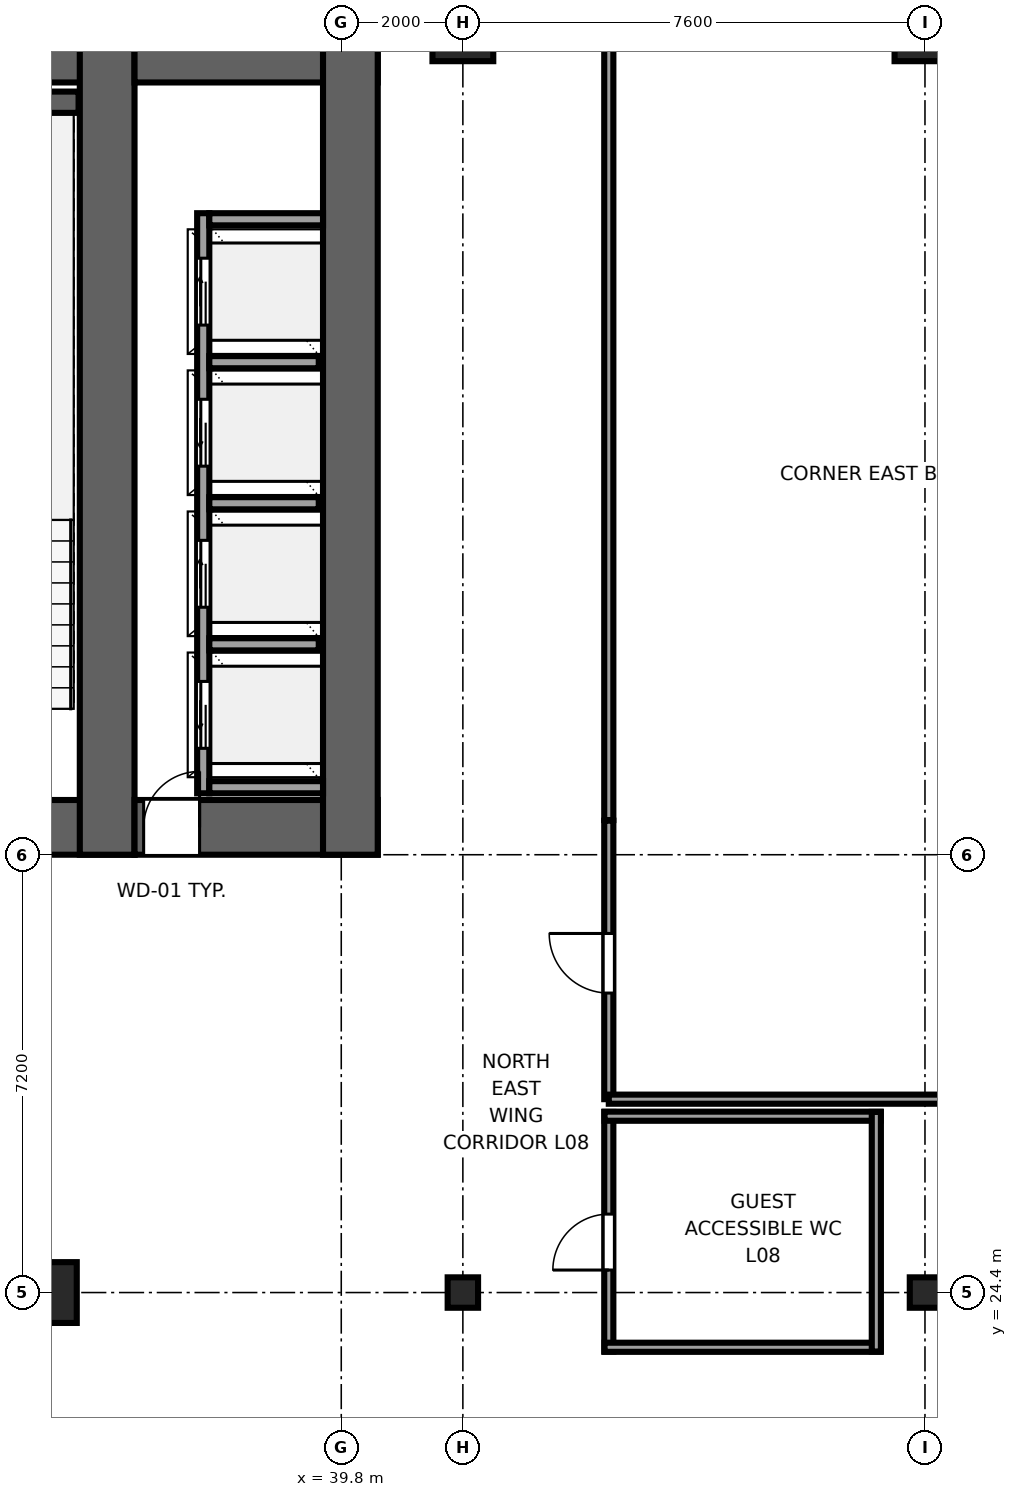
"""IFC4 building model, lengths in metres.
Left out: names, types, materials, properties, quantities, classifications, styles, units other than length and angle.
Written with IfcOpenShell. Run it as: python <this file> out.ifc"""

import sys

from ifc_helpers import new_model, si_unit, direction, frame, frame_2d, origin, origin_2d, place, context, subcontext, project, spatial, rectangle, i_section, extrude, source, transform, mapped, element, fill, save


model = new_model("IFC4")
c1 = context("Model", 3, precision=1e-05, world=origin(), true_north=direction((0.0, 1.0)))
c2 = subcontext(c1, "Body", "Model", "MODEL_VIEW")
j1 = project(units=[si_unit("LENGTHUNIT", "METRE"), si_unit("PLANEANGLEUNIT", "RADIAN")], contexts=[c1])
p1 = place(None, origin())
s1 = spatial("IfcSite", under=j1, at=p1, CompositionType="ELEMENT")
p2 = place(p1, origin())
s2 = spatial("IfcBuilding", under=s1, at=p2, CompositionType="ELEMENT")
p3 = place(p2, frame((0.0, 0.0, 39.1)))
s3 = spatial("IfcBuildingStorey", under=s2, at=p3, CompositionType="ELEMENT", Elevation=39.1)
p4 = place(p3, frame((9.6, 32.05, 0.0), z_axis=(0.0, 0.0, 1.0), x_axis=(1.0, 0.0, 0.0)))
e1 = element("IfcWall", 1, at=p4, inside=s3, PredefinedType="SHEAR", context=c2, shape_type="SweptSolid", body=[
    extrude(rectangle(XDim=26.8, YDim=0.9, at=frame_2d((13.4, 0.0))), origin(), (0.0, 0.0, 1.0), 3.55),
])
p5 = place(p4, frame((6.52, 0.0, 0.0), z_axis=(0.0, 0.0, 1.0), x_axis=(-1.0, 0.0, 0.0)))
e2 = element("IfcOpeningElement", 2, at=p5, cuts=e1, PredefinedType="OPENING", context=c2, shape_type="SweptSolid", body=[
    extrude(rectangle(XDim=1.5, YDim=2.04, at=frame_2d((0.75, 1.02))), frame((0.0, 0.46, 0.0), z_axis=(0.0, -1.0, 0.0), x_axis=(1.0, 0.0, 0.0)), (0.0, 0.0, 1.0), 0.92),
])
p6 = place(p4, frame((14.15, 0.0, 0.0), z_axis=(0.0, 0.0, 1.0), x_axis=(-1.0, 0.0, 0.0)))
e3 = element("IfcOpeningElement", 3, at=p6, cuts=e1, PredefinedType="OPENING", context=c2, shape_type="SweptSolid", body=[
    extrude(rectangle(XDim=1.5, YDim=2.04, at=frame_2d((0.75, 1.02))), frame((0.0, 0.46, 0.0), z_axis=(0.0, -1.0, 0.0), x_axis=(1.0, 0.0, 0.0)), (0.0, 0.0, 1.0), 0.92),
])
p7 = place(p4, frame((21.78, 0.0, 0.0), z_axis=(0.0, 0.0, 1.0), x_axis=(-1.0, 0.0, 0.0)))
e4 = element("IfcOpeningElement", 4, at=p7, cuts=e1, PredefinedType="OPENING", context=c2, shape_type="SweptSolid", body=[
    extrude(rectangle(XDim=1.5, YDim=2.04, at=frame_2d((0.75, 1.02))), frame((0.0, 0.46, 0.0), z_axis=(0.0, -1.0, 0.0), x_axis=(1.0, 0.0, 0.0)), (0.0, 0.0, 1.0), 0.92),
])
p8 = place(p4, frame((8.57, 0.0, 0.0), z_axis=(0.0, 0.0, 1.0), x_axis=(-1.0, 0.0, 0.0)))
e5 = element("IfcOpeningElement", 5, at=p8, cuts=e1, PredefinedType="OPENING", context=c2, shape_type="SweptSolid", body=[
    extrude(rectangle(XDim=0.82, YDim=2.01, at=frame_2d((0.41, 1.005))), frame((0.0, 0.46, 0.0), z_axis=(0.0, -1.0, 0.0), x_axis=(1.0, 0.0, 0.0)), (0.0, 0.0, 1.0), 0.92),
])
p9 = place(p4, frame((19.07, 0.0, 0.0), z_axis=(0.0, 0.0, 1.0), x_axis=(-1.0, 0.0, 0.0)))
e6 = element("IfcOpeningElement", 6, at=p9, cuts=e1, PredefinedType="OPENING", context=c2, shape_type="SweptSolid", body=[
    extrude(rectangle(XDim=0.82, YDim=2.01, at=frame_2d((0.41, 1.005))), frame((0.0, 0.46, 0.0), z_axis=(0.0, -1.0, 0.0), x_axis=(1.0, 0.0, 0.0)), (0.0, 0.0, 1.0), 0.92),
])
p10 = place(p3, frame((9.6, 44.75, 0.0), z_axis=(0.0, 0.0, 1.0), x_axis=(1.0, 0.0, 0.0)))
e7 = element("IfcWall", 7, at=p10, inside=s3, PredefinedType="SHEAR", context=c2, shape_type="SweptSolid", body=[
    extrude(rectangle(XDim=26.8, YDim=0.9, at=frame_2d((13.4, 0.0))), origin(), (0.0, 0.0, 1.0), 3.55),
])
p11 = place(p3, frame((35.95, 31.6, 0.0), z_axis=(0.0, 0.0, 1.0), x_axis=(0.0, 1.0, 0.0)))
e8 = element("IfcWall", 8, at=p11, inside=s3, PredefinedType="SHEAR", context=c2, shape_type="SweptSolid", body=[
    extrude(rectangle(XDim=13.6, YDim=0.9, at=frame_2d((6.8, 0.0))), origin(), (0.0, 0.0, 1.0), 3.55),
])
p12 = place(p3, frame((36.4, 32.05, 0.0), z_axis=(0.0, 0.0, 1.0), x_axis=(1.0, 0.0, 0.0)))
e9 = element("IfcWall", 9, at=p12, inside=s3, PredefinedType="SHEAR", context=c2, shape_type="SweptSolid", body=[
    extrude(rectangle(XDim=4.0, YDim=0.9, at=frame_2d((2.0, 0.0))), origin(), (0.0, 0.0, 1.0), 3.55),
])
p13 = place(p12, frame((1.07, 0.0, 0.0), z_axis=(0.0, 0.0, 1.0), x_axis=(-1.0, 0.0, 0.0)))
e10 = element("IfcOpeningElement", 10, at=p13, cuts=e9, PredefinedType="OPENING", context=c2, shape_type="SweptSolid", body=[
    extrude(rectangle(XDim=0.92, YDim=2.01, at=frame_2d((0.46, 1.005))), frame((0.0, 0.46, 0.0), z_axis=(0.0, -1.0, 0.0), x_axis=(1.0, 0.0, 0.0)), (0.0, 0.0, 1.0), 0.92),
])
p14 = place(p3, frame((36.4, 44.75, 0.0), z_axis=(0.0, 0.0, 1.0), x_axis=(1.0, 0.0, 0.0)))
e11 = element("IfcWall", 11, at=p14, inside=s3, PredefinedType="SHEAR", context=c2, shape_type="SweptSolid", body=[
    extrude(rectangle(XDim=4.0, YDim=0.9, at=frame_2d((2.0, 0.0))), origin(), (0.0, 0.0, 1.0), 3.55),
])
p15 = place(p3, frame((39.95, 31.6, 0.0), z_axis=(0.0, 0.0, 1.0), x_axis=(0.0, 1.0, 0.0)))
e12 = element("IfcWall", 12, at=p15, inside=s3, PredefinedType="SHEAR", context=c2, shape_type="SweptSolid", body=[
    extrude(rectangle(XDim=13.6, YDim=0.9, at=frame_2d((6.8, 0.0))), origin(), (0.0, 0.0, 1.0), 3.55),
])
p16 = place(p3, frame((31.88, 43.975, 0.0), z_axis=(0.0, 0.0, 1.0), x_axis=(1.0, 0.0, 0.0)))
e13 = element("IfcWall", 13, at=p16, inside=s3, PredefinedType="SHEAR", context=c2, shape_type="SweptSolid", body=[
    extrude(rectangle(XDim=3.6, YDim=0.35, at=frame_2d((1.8, 0.0))), origin(), (0.0, 0.0, 1.0), 3.55),
])
m1 = source(origin(), c2, "Body", "SweptSolid", [
    extrude(rectangle(XDim=1.0, YDim=1.0, at=origin_2d()), origin(), (0.0, 0.0, 1.0), 3.55),
])
p17 = place(p3, frame((34.95, 24.4, 0.0), z_axis=(0.0, 0.0, 1.0), x_axis=(1.0, 0.0, 0.0)))
e14 = element("IfcColumn", 14, at=p17, inside=s3, PredefinedType="COLUMN", context=c2, shape_type="MappedRepresentation", body=[
    mapped(m1, transform((0.0, 0.0, 0.0), x_axis=(1.0, 0.0, 0.0), y_axis=(0.0, 1.0, 0.0), z_axis=(0.0, 0.0, 1.0), scale=1.0)),
])
m2 = source(origin(), c2, "Body", "SweptSolid", [
    extrude(i_section(OverallWidth=0.5, OverallDepth=0.5, WebThickness=0.028, FlangeThickness=0.045, at=origin_2d()), origin(), (0.0, 0.0, 1.0), 3.55),
])
for number, where, z_axis, x_axis in (
    (15, (41.8, 24.4, 0.0), (0.0, 0.0, 1.0), (1.0, 0.0, 0.0)),
    (16, (49.4, 24.4, 0.0), (0.0, 0.0, 1.0), (1.0, 0.0, 0.0)),
):
    element("IfcColumn", number, at=place(p3, frame(where, z_axis=z_axis, x_axis=x_axis)), inside=s3, PredefinedType="COLUMN", context=c2, shape_type="MappedRepresentation", body=[
        mapped(m2, transform((0.0, 0.0, 0.0), x_axis=(1.0, 0.0, 0.0), y_axis=(0.0, 1.0, 0.0), z_axis=(0.0, 0.0, 1.0), scale=1.0)),
    ])
for number, where, z_axis, x_axis in (
    (17, (41.8, 45.15, 0.0), (0.0, 0.0, 1.0), (1.0, 0.0, 0.0)),
    (18, (49.4, 45.15, 0.0), (0.0, 0.0, 1.0), (1.0, 0.0, 0.0)),
):
    element("IfcColumn", number, at=place(p3, frame(where, z_axis=z_axis, x_axis=x_axis)), inside=s3, PredefinedType="COLUMN", context=c2, shape_type="MappedRepresentation", body=[
        mapped(m1, transform((0.0, 0.0, 0.0), x_axis=(1.0, 0.0, 0.0), y_axis=(0.0, 1.0, 0.0), z_axis=(0.0, 0.0, 1.0), scale=1.0)),
    ])
p18 = place(p3, frame((37.53, 32.61, 0.0), z_axis=(0.0, 0.0, 1.0), x_axis=(0.0, 1.0, 0.0)))
e19 = element("IfcWall", 19, at=p18, inside=s3, PredefinedType="SOLIDWALL", context=c2, shape_type="SweptSolid", body=[
    extrude(rectangle(XDim=9.54, YDim=0.2, at=frame_2d((4.77, 0.0))), origin(), (0.0, 0.0, 1.0), 3.37),
])
p19 = place(p18, frame((0.74, 0.0, 0.0)))
e20 = element("IfcOpeningElement", 20, at=p19, cuts=e19, PredefinedType="OPENING", context=c2, shape_type="SweptSolid", body=[
    extrude(rectangle(XDim=1.1, YDim=2.12, at=frame_2d((0.55, 1.06))), frame((0.0, 0.11, 0.0), z_axis=(0.0, -1.0, 0.0), x_axis=(1.0, 0.0, 0.0)), (0.0, 0.0, 1.0), 0.22),
])
p20 = place(p18, frame((3.06, 0.0, 0.0)))
e21 = element("IfcOpeningElement", 21, at=p20, cuts=e19, PredefinedType="OPENING", context=c2, shape_type="SweptSolid", body=[
    extrude(rectangle(XDim=1.1, YDim=2.12, at=frame_2d((0.55, 1.06))), frame((0.0, 0.11, 0.0), z_axis=(0.0, -1.0, 0.0), x_axis=(1.0, 0.0, 0.0)), (0.0, 0.0, 1.0), 0.22),
])
p21 = place(p18, frame((5.38, 0.0, 0.0)))
e22 = element("IfcOpeningElement", 22, at=p21, cuts=e19, PredefinedType="OPENING", context=c2, shape_type="SweptSolid", body=[
    extrude(rectangle(XDim=1.1, YDim=2.12, at=frame_2d((0.55, 1.06))), frame((0.0, 0.11, 0.0), z_axis=(0.0, -1.0, 0.0), x_axis=(1.0, 0.0, 0.0)), (0.0, 0.0, 1.0), 0.22),
])
p22 = place(p18, frame((7.7, 0.0, 0.0)))
e23 = element("IfcOpeningElement", 23, at=p22, cuts=e19, PredefinedType="OPENING", context=c2, shape_type="SweptSolid", body=[
    extrude(rectangle(XDim=1.1, YDim=2.12, at=frame_2d((0.55, 1.06))), frame((0.0, 0.11, 0.0), z_axis=(0.0, -1.0, 0.0), x_axis=(1.0, 0.0, 0.0)), (0.0, 0.0, 1.0), 0.22),
])
for number, where, z_axis, x_axis in (
    (24, (37.63, 32.71, 0.0), (0.0, 0.0, 1.0), (1.0, 0.0, 0.0)),
    (25, (37.63, 42.05, 0.0), (0.0, 0.0, 1.0), (1.0, 0.0, 0.0)),
):
    element("IfcWall", number, at=place(p3, frame(where, z_axis=z_axis, x_axis=x_axis)), inside=s3, PredefinedType="SOLIDWALL", context=c2, shape_type="SweptSolid", body=[
        extrude(rectangle(XDim=1.87, YDim=0.2, at=frame_2d((0.935, 0.0))), origin(), (0.0, 0.0, 1.0), 3.37),
    ])
for number, where, z_axis, x_axis in (
    (26, (37.63, 35.06, 0.0), (0.0, 0.0, 1.0), (1.0, 0.0, 0.0)),
    (27, (37.63, 37.38, 0.0), (0.0, 0.0, 1.0), (1.0, 0.0, 0.0)),
    (28, (37.63, 39.7, 0.0), (0.0, 0.0, 1.0), (1.0, 0.0, 0.0)),
):
    element("IfcWall", number, at=place(p3, frame(where, z_axis=z_axis, x_axis=x_axis)), inside=s3, PredefinedType="SOLIDWALL", context=c2, shape_type="SweptSolid", body=[
        extrude(rectangle(XDim=1.8, YDim=0.2, at=frame_2d((0.9, 0.0))), origin(), (0.0, 0.0, 1.0), 3.37),
    ])
p23 = place(p3, frame((44.2, 23.43, 0.0), z_axis=(0.0, 0.0, 1.0), x_axis=(0.0, 1.0, 0.0)))
e29 = element("IfcWall", 29, at=p23, inside=s3, PredefinedType="PARTITIONING", context=c2, shape_type="SweptSolid", body=[
    extrude(rectangle(XDim=3.94, YDim=0.15, at=frame_2d((1.97, 0.0))), origin(), (0.0, 0.0, 1.0), 3.37),
])
p24 = place(p23, frame((1.34, 0.0, 0.0)))
e30 = element("IfcOpeningElement", 30, at=p24, cuts=e29, PredefinedType="OPENING", context=c2, shape_type="SweptSolid", body=[
    extrude(rectangle(XDim=0.92, YDim=2.01, at=frame_2d((0.46, 1.005))), frame((0.0, 0.085, 0.0), z_axis=(0.0, -1.0, 0.0), x_axis=(1.0, 0.0, 0.0)), (0.0, 0.0, 1.0), 0.17),
])
for number, where, z_axis, x_axis in (
    (31, (44.13, 23.5, 0.0), (0.0, 0.0, 1.0), (1.0, 0.0, 0.0)),
    (32, (44.13, 27.3, 0.0), (0.0, 0.0, 1.0), (1.0, 0.0, 0.0)),
):
    element("IfcWall", number, at=place(p3, frame(where, z_axis=z_axis, x_axis=x_axis)), inside=s3, PredefinedType="PARTITIONING", context=c2, shape_type="SweptSolid", body=[
        extrude(rectangle(XDim=4.54, YDim=0.15, at=frame_2d((2.27, 0.0))), origin(), (0.0, 0.0, 1.0), 3.37),
    ])
p25 = place(p3, frame((48.6, 23.43, 0.0), z_axis=(0.0, 0.0, 1.0), x_axis=(0.0, 1.0, 0.0)))
e33 = element("IfcWall", 33, at=p25, inside=s3, PredefinedType="PARTITIONING", context=c2, shape_type="SweptSolid", body=[
    extrude(rectangle(XDim=3.94, YDim=0.15, at=frame_2d((1.97, 0.0))), origin(), (0.0, 0.0, 1.0), 3.37),
])
p26 = place(p3, frame((44.2, 27.58, 0.0), z_axis=(0.0, 0.0, 1.0), x_axis=(0.0, 1.0, 0.0)))
e34 = element("IfcWall", 34, at=p26, inside=s3, PredefinedType="PARTITIONING", context=c2, shape_type="SweptSolid", body=[
    extrude(rectangle(XDim=4.58, YDim=0.15, at=frame_2d((2.29, 0.0))), origin(), (0.0, 0.0, 1.0), 3.37),
])
p27 = place(p26, frame((1.745, 0.0, 0.0)))
e35 = element("IfcOpeningElement", 35, at=p27, cuts=e34, PredefinedType="OPENING", context=c2, shape_type="SweptSolid", body=[
    extrude(rectangle(XDim=0.98, YDim=2.12, at=frame_2d((0.49, 1.06))), frame((0.0, 0.085, 0.0), z_axis=(0.0, -1.0, 0.0), x_axis=(1.0, 0.0, 0.0)), (0.0, 0.0, 1.0), 0.17),
])
p28 = place(p3, frame((44.2, 27.58, 0.0), z_axis=(0.0, 0.0, 1.0), x_axis=(1.0, 0.0, 0.0)))
e36 = element("IfcWall", 36, at=p28, inside=s3, PredefinedType="PARTITIONING", context=c2, shape_type="SweptSolid", body=[
    extrude(rectangle(XDim=10.03, YDim=0.15, at=frame_2d((5.015, 0.0))), origin(), (0.0, 0.0, 1.0), 3.37),
])
p29 = place(p3, frame((44.2, 32.17, 0.0), z_axis=(0.0, 0.0, 1.0), x_axis=(0.0, 1.0, 0.0)))
e37 = element("IfcWall", 37, at=p29, inside=s3, PredefinedType="PARTITIONING", context=c2, shape_type="SweptSolid", body=[
    extrude(rectangle(XDim=13.425, YDim=0.15, at=frame_2d((6.712, 0.0))), origin(), (0.0, 0.0, 1.0), 3.37),
])
m3 = source(origin(), c2, "Body", "SweptSolid", [
    extrude(rectangle(XDim=0.92, YDim=2.01, at=frame_2d((0.46, 1.005))), frame((0.0, 0.025, 0.0), z_axis=(0.0, -1.0, 0.0), x_axis=(1.0, 0.0, 0.0)), (0.0, 0.0, 1.0), 0.05),
])
p30 = place(p13, origin())
e38 = element("IfcDoor", 38, at=p30, inside=s3, OperationType="SINGLE_SWING_RIGHT", PredefinedType="DOOR", context=c2, shape_type="MappedRepresentation", body=[
    mapped(m3, transform((0.0, 0.0, 0.0), x_axis=(1.0, 0.0, 0.0), y_axis=(0.0, 1.0, 0.0), z_axis=(0.0, 0.0, 1.0), scale=1.0)),
])
fill(e10, e38)
m4 = source(origin(), c2, "Body", "SweptSolid", [
    extrude(rectangle(XDim=1.1, YDim=2.12, at=frame_2d((0.55, 1.06))), frame((0.0, 0.025, 0.0), z_axis=(0.0, -1.0, 0.0), x_axis=(1.0, 0.0, 0.0)), (0.0, 0.0, 1.0), 0.05),
])
p31 = place(p19, origin())
e39 = element("IfcDoor", 39, at=p31, inside=s3, OperationType="SLIDING_TO_LEFT", PredefinedType="DOOR", context=c2, shape_type="MappedRepresentation", body=[
    mapped(m4, transform((0.0, 0.0, 0.0), x_axis=(1.0, 0.0, 0.0), y_axis=(0.0, 1.0, 0.0), z_axis=(0.0, 0.0, 1.0), scale=1.0)),
])
fill(e20, e39)
p32 = place(p20, origin())
e40 = element("IfcDoor", 40, at=p32, inside=s3, OperationType="SLIDING_TO_RIGHT", PredefinedType="DOOR", context=c2, shape_type="MappedRepresentation", body=[
    mapped(m4, transform((0.0, 0.0, 0.0), x_axis=(1.0, 0.0, 0.0), y_axis=(0.0, 1.0, 0.0), z_axis=(0.0, 0.0, 1.0), scale=1.0)),
])
fill(e21, e40)
p33 = place(p21, origin())
e41 = element("IfcDoor", 41, at=p33, inside=s3, OperationType="SLIDING_TO_LEFT", PredefinedType="DOOR", context=c2, shape_type="MappedRepresentation", body=[
    mapped(m4, transform((0.0, 0.0, 0.0), x_axis=(1.0, 0.0, 0.0), y_axis=(0.0, 1.0, 0.0), z_axis=(0.0, 0.0, 1.0), scale=1.0)),
])
fill(e22, e41)
p34 = place(p22, origin())
e42 = element("IfcDoor", 42, at=p34, inside=s3, OperationType="SLIDING_TO_RIGHT", PredefinedType="DOOR", context=c2, shape_type="MappedRepresentation", body=[
    mapped(m4, transform((0.0, 0.0, 0.0), x_axis=(1.0, 0.0, 0.0), y_axis=(0.0, 1.0, 0.0), z_axis=(0.0, 0.0, 1.0), scale=1.0)),
])
fill(e23, e42)
p35 = place(p24, origin())
e43 = element("IfcDoor", 43, at=p35, inside=s3, OperationType="SINGLE_SWING_LEFT", PredefinedType="DOOR", context=c2, shape_type="MappedRepresentation", body=[
    mapped(m3, transform((0.0, 0.0, 0.0), x_axis=(1.0, 0.0, 0.0), y_axis=(0.0, 1.0, 0.0), z_axis=(0.0, 0.0, 1.0), scale=1.0)),
])
fill(e30, e43)
m5 = source(origin(), c2, "Body", "SweptSolid", [
    extrude(rectangle(XDim=0.98, YDim=2.12, at=frame_2d((0.49, 1.06))), frame((0.0, 0.025, 0.0), z_axis=(0.0, -1.0, 0.0), x_axis=(1.0, 0.0, 0.0)), (0.0, 0.0, 1.0), 0.05),
])
p36 = place(p27, origin())
e44 = element("IfcDoor", 44, at=p36, inside=s3, OperationType="SINGLE_SWING_RIGHT", PredefinedType="DOOR", context=c2, shape_type="MappedRepresentation", body=[
    mapped(m5, transform((0.0, 0.0, 0.0), x_axis=(1.0, 0.0, 0.0), y_axis=(0.0, 1.0, 0.0), z_axis=(0.0, 0.0, 1.0), scale=1.0)),
])
fill(e35, e44)
save(model, sys.argv[1])
